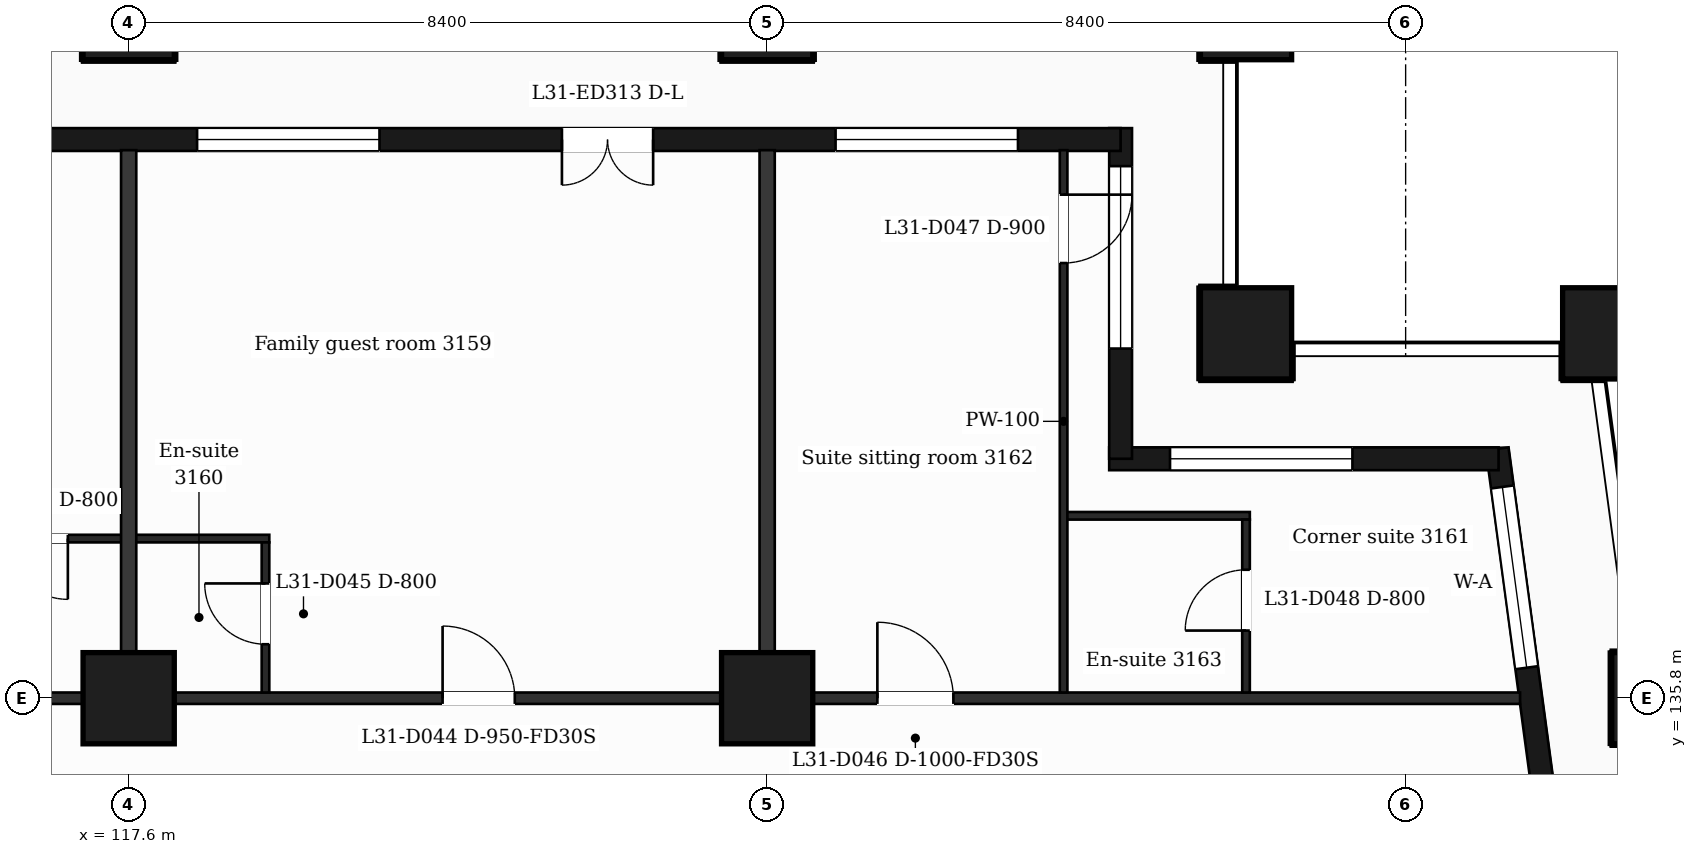
"""IFC4 building model, lengths in metres.
Left out: names, types, materials, properties, quantities, classifications, styles, units other than length and angle.
Written with IfcOpenShell. Run it as: python <this file> out.ifc"""

import sys

from ifc_helpers import new_model, si_unit, direction, frame, frame_2d, origin, origin_2d, place, context, subcontext, project, spatial, rectangle, extrude, element, fill, save


model = new_model("IFC4")
c1 = context("Model", 3, precision=1e-05, world=origin(), true_north=direction((0.0, 1.0)))
c2 = subcontext(c1, "Body", "Model", "MODEL_VIEW")
j1 = project(units=[si_unit("LENGTHUNIT", "METRE"), si_unit("PLANEANGLEUNIT", "RADIAN")], contexts=[c1])
p1 = place(None, origin())
s1 = spatial("IfcSite", under=j1, at=p1, CompositionType="ELEMENT")
p2 = place(p1, origin())
s2 = spatial("IfcBuilding", under=s1, at=p2, CompositionType="ELEMENT")
p3 = place(p2, frame((0.0, 0.0, 131.7)))
s3 = spatial("IfcBuildingStorey", under=s2, at=p3, CompositionType="ELEMENT", Elevation=131.7)
for number, where, z_axis, x_axis in (
    (1, (132.3, 140.6, 0.0), (0.0, 0.0, 1.0), (1.0, 0.0, 0.0)),
    (2, (137.065, 140.6, 0.0), (0.0, 0.0, 1.0), (1.0, 0.0, 0.0)),
    (3, (117.6, 135.8, 0.0), (0.0, 0.0, 1.0), (1.0, 0.0, 0.0)),
    (4, (126.0, 135.8, 0.0), (0.0, 0.0, 1.0), (1.0, 0.0, 0.0)),
    (5, (137.711, 135.8, 0.0), (0.0, 0.0, 1.0), (1.0, 0.0, 0.0)),
    (6, (117.6, 144.8, 0.0), (0.0, 0.0, 1.0), (1.0, 0.0, 0.0)),
    (7, (126.0, 144.8, 0.0), (0.0, 0.0, 1.0), (1.0, 0.0, 0.0)),
    (8, (132.3, 144.8, 0.0), (0.0, 0.0, 1.0), (1.0, 0.0, 0.0)),
):
    element("IfcColumn", number, at=place(p3, frame(where, z_axis=z_axis, x_axis=x_axis)), inside=s3, PredefinedType="COLUMN", context=c2, shape_type="SweptSolid", body=[
        extrude(rectangle(XDim=1.2, YDim=1.2, at=origin_2d()), origin(), (0.0, 0.0, 1.0), 3.7),
    ])
p4 = place(p3, frame((136.504, 132.4, 0.0), z_axis=(0.0, 0.0, 1.0), x_axis=(-0.133399697462, 0.99106231929, 0.0)))
e9 = element("IfcWall", 9, at=p4, inside=s3, PredefinedType="SOLIDWALL", context=c2, shape_type="SweptSolid", body=[
    extrude(rectangle(XDim=6.74, YDim=0.3, at=frame_2d((3.37, 0.0))), origin(), (0.0, 0.0, 1.0), 3.2),
])
p5 = place(p4, frame((1.115, 0.0, 0.0)))
e10 = element("IfcOpeningElement", 10, at=p5, cuts=e9, PredefinedType="OPENING", context=c2, shape_type="SweptSolid", body=[
    extrude(rectangle(XDim=1.2, YDim=2.4, at=frame_2d((0.6, 1.2))), frame((0.0, 0.16, 0.0), z_axis=(0.0, -1.0, 0.0), x_axis=(1.0, 0.0, 0.0)), (0.0, 0.0, 1.0), 0.32),
])
p6 = place(p4, frame((3.835, 0.0, 0.9)))
e11 = element("IfcOpeningElement", 11, at=p6, cuts=e9, PredefinedType="OPENING", context=c2, shape_type="SweptSolid", body=[
    extrude(rectangle(XDim=2.4, YDim=2.1, at=frame_2d((1.2, 1.05))), frame((0.0, 0.16, 0.0), z_axis=(0.0, -1.0, 0.0), x_axis=(1.0, 0.0, 0.0)), (0.0, 0.0, 1.0), 0.32),
])
p7 = place(p3, frame((135.623, 138.95, 0.0), z_axis=(0.0, 0.0, 1.0), x_axis=(-1.0, 0.0, 0.0)))
e12 = element("IfcWall", 12, at=p7, inside=s3, PredefinedType="SOLIDWALL", context=c2, shape_type="SweptSolid", body=[
    extrude(rectangle(XDim=5.123, YDim=0.3, at=frame_2d((2.561, 0.0))), origin(), (0.0, 0.0, 1.0), 3.2),
])
p8 = place(p7, frame((1.923, 0.0, 0.9)))
e13 = element("IfcOpeningElement", 13, at=p8, cuts=e12, PredefinedType="OPENING", context=c2, shape_type="SweptSolid", body=[
    extrude(rectangle(XDim=2.4, YDim=2.1, at=frame_2d((1.2, 1.05))), frame((0.0, 0.16, 0.0), z_axis=(0.0, -1.0, 0.0), x_axis=(1.0, 0.0, 0.0)), (0.0, 0.0, 1.0), 0.32),
])
p9 = place(p3, frame((130.65, 138.95, 0.0), z_axis=(0.0, 0.0, 1.0), x_axis=(0.0, 1.0, 0.0)))
e14 = element("IfcWall", 14, at=p9, inside=s3, PredefinedType="SOLIDWALL", context=c2, shape_type="SweptSolid", body=[
    extrude(rectangle(XDim=4.35, YDim=0.3, at=frame_2d((2.175, 0.0))), origin(), (0.0, 0.0, 1.0), 3.2),
])
p10 = place(p9, frame((1.45, 0.0, 0.9)))
e15 = element("IfcOpeningElement", 15, at=p10, cuts=e14, PredefinedType="OPENING", context=c2, shape_type="SweptSolid", body=[
    extrude(rectangle(XDim=2.4, YDim=2.1, at=frame_2d((1.2, 1.05))), frame((0.0, 0.16, 0.0), z_axis=(0.0, -1.0, 0.0), x_axis=(1.0, 0.0, 0.0)), (0.0, 0.0, 1.0), 0.32),
])
p11 = place(p3, frame((130.65, 143.15, 0.0), z_axis=(0.0, 0.0, 1.0), x_axis=(-1.0, 0.0, 0.0)))
e16 = element("IfcWall", 16, at=p11, inside=s3, PredefinedType="SOLIDWALL", context=c2, shape_type="SweptSolid", body=[
    extrude(rectangle(XDim=14.25, YDim=0.3, at=frame_2d((7.125, 0.0))), origin(), (0.0, 0.0, 1.0), 3.2),
])
p12 = place(p11, frame((1.35, 0.0, 0.9)))
e17 = element("IfcOpeningElement", 17, at=p12, cuts=e16, PredefinedType="OPENING", context=c2, shape_type="SweptSolid", body=[
    extrude(rectangle(XDim=2.4, YDim=2.1, at=frame_2d((1.2, 1.05))), frame((0.0, 0.16, 0.0), z_axis=(0.0, -1.0, 0.0), x_axis=(1.0, 0.0, 0.0)), (0.0, 0.0, 1.0), 0.32),
])
p13 = place(p11, frame((6.15, 0.0, 0.0)))
e18 = element("IfcOpeningElement", 18, at=p13, cuts=e16, PredefinedType="OPENING", context=c2, shape_type="SweptSolid", body=[
    extrude(rectangle(XDim=1.2, YDim=2.4, at=frame_2d((0.6, 1.2))), frame((0.0, 0.16, 0.0), z_axis=(0.0, -1.0, 0.0), x_axis=(1.0, 0.0, 0.0)), (0.0, 0.0, 1.0), 0.32),
])
p14 = place(p11, frame((9.75, 0.0, 0.9)))
e19 = element("IfcOpeningElement", 19, at=p14, cuts=e16, PredefinedType="OPENING", context=c2, shape_type="SweptSolid", body=[
    extrude(rectangle(XDim=2.4, YDim=2.1, at=frame_2d((1.2, 1.05))), frame((0.0, 0.16, 0.0), z_axis=(0.0, -1.0, 0.0), x_axis=(1.0, 0.0, 0.0)), (0.0, 0.0, 1.0), 0.32),
])
p15 = place(p3, frame((90.895, 135.8, 0.0), z_axis=(0.0, 0.0, 1.0), x_axis=(1.0, 0.0, 0.0)))
e20 = element("IfcWall", 20, at=p15, inside=s3, PredefinedType="PARTITIONING", context=c2, shape_type="SweptSolid", body=[
    extrude(rectangle(XDim=45.011, YDim=0.15, at=frame_2d((22.505, 0.0))), origin(), (0.0, 0.0, 1.0), 3.2),
])
p16 = place(p15, frame((8.005, 0.0, 0.0)))
e21 = element("IfcOpeningElement", 21, at=p16, cuts=e20, PredefinedType="OPENING", context=c2, shape_type="SweptSolid", body=[
    extrude(rectangle(XDim=1.0, YDim=2.1, at=frame_2d((0.5, 1.05))), frame((0.0, 0.085, 0.0), z_axis=(0.0, -1.0, 0.0), x_axis=(1.0, 0.0, 0.0)), (0.0, 0.0, 1.0), 0.17),
])
p17 = place(p15, frame((10.625, 0.0, 0.0)))
e22 = element("IfcOpeningElement", 22, at=p17, cuts=e20, PredefinedType="OPENING", context=c2, shape_type="SweptSolid", body=[
    extrude(rectangle(XDim=0.95, YDim=2.1, at=frame_2d((0.475, 1.05))), frame((0.0, 0.085, 0.0), z_axis=(0.0, -1.0, 0.0), x_axis=(1.0, 0.0, 0.0)), (0.0, 0.0, 1.0), 0.17),
])
p18 = place(p15, frame((14.38, 0.0, 0.0)))
e23 = element("IfcOpeningElement", 23, at=p18, cuts=e20, PredefinedType="OPENING", context=c2, shape_type="SweptSolid", body=[
    extrude(rectangle(XDim=0.95, YDim=2.1, at=frame_2d((0.475, 1.05))), frame((0.0, 0.085, 0.0), z_axis=(0.0, -1.0, 0.0), x_axis=(1.0, 0.0, 0.0)), (0.0, 0.0, 1.0), 0.17),
])
p19 = place(p15, frame((21.265, 0.0, 0.0)))
e24 = element("IfcOpeningElement", 24, at=p19, cuts=e20, PredefinedType="OPENING", context=c2, shape_type="SweptSolid", body=[
    extrude(rectangle(XDim=0.95, YDim=2.1, at=frame_2d((0.475, 1.05))), frame((0.0, 0.085, 0.0), z_axis=(0.0, -1.0, 0.0), x_axis=(1.0, 0.0, 0.0)), (0.0, 0.0, 1.0), 0.17),
])
p20 = place(p15, frame((30.835, 0.0, 0.0)))
e25 = element("IfcOpeningElement", 25, at=p20, cuts=e20, PredefinedType="OPENING", context=c2, shape_type="SweptSolid", body=[
    extrude(rectangle(XDim=0.95, YDim=2.1, at=frame_2d((0.475, 1.05))), frame((0.0, 0.085, 0.0), z_axis=(0.0, -1.0, 0.0), x_axis=(1.0, 0.0, 0.0)), (0.0, 0.0, 1.0), 0.17),
])
p21 = place(p15, frame((36.555, 0.0, 0.0)))
e26 = element("IfcOpeningElement", 26, at=p21, cuts=e20, PredefinedType="OPENING", context=c2, shape_type="SweptSolid", body=[
    extrude(rectangle(XDim=1.0, YDim=2.1, at=frame_2d((0.5, 1.05))), frame((0.0, 0.085, 0.0), z_axis=(0.0, -1.0, 0.0), x_axis=(1.0, 0.0, 0.0)), (0.0, 0.0, 1.0), 0.17),
])
p22 = place(p3, frame((115.15, 137.9, 0.0), z_axis=(0.0, 0.0, 1.0), x_axis=(1.0, 0.0, 0.0)))
e27 = element("IfcWall", 27, at=p22, inside=s3, PredefinedType="PARTITIONING", context=c2, shape_type="SweptSolid", body=[
    extrude(rectangle(XDim=4.3, YDim=0.1, at=frame_2d((2.15, 0.0))), origin(), (0.0, 0.0, 1.0), 3.2),
])
p23 = place(p22, frame((0.85, 0.0, 0.0)))
e28 = element("IfcOpeningElement", 28, at=p23, cuts=e27, PredefinedType="OPENING", context=c2, shape_type="SweptSolid", body=[
    extrude(rectangle(XDim=0.8, YDim=2.1, at=frame_2d((0.4, 1.05))), frame((0.0, 0.06, 0.0), z_axis=(0.0, -1.0, 0.0), x_axis=(1.0, 0.0, 0.0)), (0.0, 0.0, 1.0), 0.12),
])
p24 = place(p3, frame((129.9, 138.2, 0.0), z_axis=(0.0, 0.0, 1.0), x_axis=(1.0, 0.0, 0.0)))
e29 = element("IfcWall", 29, at=p24, inside=s3, PredefinedType="PARTITIONING", context=c2, shape_type="SweptSolid", body=[
    extrude(rectangle(XDim=2.45, YDim=0.1, at=frame_2d((1.225, 0.0))), origin(), (0.0, 0.0, 1.0), 3.2),
])
p25 = place(p3, frame((117.6, 135.875, 0.0), z_axis=(0.0, 0.0, 1.0), x_axis=(0.0, 1.0, 0.0)))
e30 = element("IfcWall", 30, at=p25, inside=s3, PredefinedType="PARTITIONING", context=c2, shape_type="SweptSolid", body=[
    extrude(rectangle(XDim=7.135, YDim=0.2, at=frame_2d((3.567, 0.0))), origin(), (0.0, 0.0, 1.0), 3.2),
])
p26 = place(p3, frame((119.4, 135.875, 0.0), z_axis=(0.0, 0.0, 1.0), x_axis=(0.0, 1.0, 0.0)))
e31 = element("IfcWall", 31, at=p26, inside=s3, PredefinedType="PARTITIONING", context=c2, shape_type="SweptSolid", body=[
    extrude(rectangle(XDim=1.975, YDim=0.1, at=frame_2d((0.988, 0.0))), origin(), (0.0, 0.0, 1.0), 3.2),
])
p27 = place(p26, frame((0.635, 0.0, 0.0)))
e32 = element("IfcOpeningElement", 32, at=p27, cuts=e31, PredefinedType="OPENING", context=c2, shape_type="SweptSolid", body=[
    extrude(rectangle(XDim=0.8, YDim=2.1, at=frame_2d((0.4, 1.05))), frame((0.0, 0.06, 0.0), z_axis=(0.0, -1.0, 0.0), x_axis=(1.0, 0.0, 0.0)), (0.0, 0.0, 1.0), 0.12),
])
p28 = place(p3, frame((126.0, 135.875, 0.0), z_axis=(0.0, 0.0, 1.0), x_axis=(0.0, 1.0, 0.0)))
e33 = element("IfcWall", 33, at=p28, inside=s3, PredefinedType="PARTITIONING", context=c2, shape_type="SweptSolid", body=[
    extrude(rectangle(XDim=7.135, YDim=0.2, at=frame_2d((3.567, 0.0))), origin(), (0.0, 0.0, 1.0), 3.2),
])
p29 = place(p3, frame((129.9, 135.875, 0.0), z_axis=(0.0, 0.0, 1.0), x_axis=(0.0, 1.0, 0.0)))
e34 = element("IfcWall", 34, at=p29, inside=s3, PredefinedType="PARTITIONING", context=c2, shape_type="SweptSolid", body=[
    extrude(rectangle(XDim=7.135, YDim=0.1, at=frame_2d((3.567, 0.0))), origin(), (0.0, 0.0, 1.0), 3.2),
])
p30 = place(p29, frame((5.65, 0.0, 0.0)))
e35 = element("IfcOpeningElement", 35, at=p30, cuts=e34, PredefinedType="OPENING", context=c2, shape_type="SweptSolid", body=[
    extrude(rectangle(XDim=0.9, YDim=2.1, at=frame_2d((0.45, 1.05))), frame((0.0, 0.06, 0.0), z_axis=(0.0, -1.0, 0.0), x_axis=(1.0, 0.0, 0.0)), (0.0, 0.0, 1.0), 0.12),
])
p31 = place(p3, frame((132.3, 135.875, 0.0), z_axis=(0.0, 0.0, 1.0), x_axis=(0.0, 1.0, 0.0)))
e36 = element("IfcWall", 36, at=p31, inside=s3, PredefinedType="PARTITIONING", context=c2, shape_type="SweptSolid", body=[
    extrude(rectangle(XDim=2.275, YDim=0.1, at=frame_2d((1.137, 0.0))), origin(), (0.0, 0.0, 1.0), 3.2),
])
p32 = place(p31, frame((0.815, 0.0, 0.0)))
e37 = element("IfcOpeningElement", 37, at=p32, cuts=e36, PredefinedType="OPENING", context=c2, shape_type="SweptSolid", body=[
    extrude(rectangle(XDim=0.8, YDim=2.1, at=frame_2d((0.4, 1.05))), frame((0.0, 0.06, 0.0), z_axis=(0.0, -1.0, 0.0), x_axis=(1.0, 0.0, 0.0)), (0.0, 0.0, 1.0), 0.12),
])
p33 = place(p6, origin())
e38 = element("IfcWindow", 38, at=p33, inside=s3, PartitioningType="SINGLE_PANEL", PredefinedType="WINDOW", context=c2, shape_type="SweptSolid", body=[
    extrude(rectangle(XDim=2.4, YDim=2.1, at=frame_2d((1.2, 1.05))), frame((0.0, 0.03, 0.0), z_axis=(0.0, -1.0, 0.0), x_axis=(1.0, 0.0, 0.0)), (0.0, 0.0, 1.0), 0.06),
])
fill(e11, e38)
p34 = place(p8, origin())
e39 = element("IfcWindow", 39, at=p34, inside=s3, PartitioningType="SINGLE_PANEL", PredefinedType="WINDOW", context=c2, shape_type="SweptSolid", body=[
    extrude(rectangle(XDim=2.4, YDim=2.1, at=frame_2d((1.2, 1.05))), frame((0.0, 0.03, 0.0), z_axis=(0.0, -1.0, 0.0), x_axis=(1.0, 0.0, 0.0)), (0.0, 0.0, 1.0), 0.06),
])
fill(e13, e39)
p35 = place(p10, origin())
e40 = element("IfcWindow", 40, at=p35, inside=s3, PartitioningType="SINGLE_PANEL", PredefinedType="WINDOW", context=c2, shape_type="SweptSolid", body=[
    extrude(rectangle(XDim=2.4, YDim=2.1, at=frame_2d((1.2, 1.05))), frame((0.0, 0.03, 0.0), z_axis=(0.0, -1.0, 0.0), x_axis=(1.0, 0.0, 0.0)), (0.0, 0.0, 1.0), 0.06),
])
fill(e15, e40)
p36 = place(p12, origin())
e41 = element("IfcWindow", 41, at=p36, inside=s3, PartitioningType="SINGLE_PANEL", PredefinedType="WINDOW", context=c2, shape_type="SweptSolid", body=[
    extrude(rectangle(XDim=2.4, YDim=2.1, at=frame_2d((1.2, 1.05))), frame((0.0, 0.03, 0.0), z_axis=(0.0, -1.0, 0.0), x_axis=(1.0, 0.0, 0.0)), (0.0, 0.0, 1.0), 0.06),
])
fill(e17, e41)
p37 = place(p13, origin())
e42 = element("IfcDoor", 42, at=p37, inside=s3, OperationType="DOUBLE_DOOR_SINGLE_SWING", PredefinedType="DOOR", context=c2, shape_type="SweptSolid", body=[
    extrude(rectangle(XDim=1.2, YDim=2.4, at=frame_2d((0.6, 1.2))), frame((0.0, 0.025, 0.0), z_axis=(0.0, -1.0, 0.0), x_axis=(1.0, 0.0, 0.0)), (0.0, 0.0, 1.0), 0.05),
])
fill(e18, e42)
p38 = place(p14, origin())
e43 = element("IfcWindow", 43, at=p38, inside=s3, PartitioningType="SINGLE_PANEL", PredefinedType="WINDOW", context=c2, shape_type="SweptSolid", body=[
    extrude(rectangle(XDim=2.4, YDim=2.1, at=frame_2d((1.2, 1.05))), frame((0.0, 0.03, 0.0), z_axis=(0.0, -1.0, 0.0), x_axis=(1.0, 0.0, 0.0)), (0.0, 0.0, 1.0), 0.06),
])
fill(e19, e43)
p39 = place(p23, origin())
e44 = element("IfcDoor", 44, at=p39, inside=s3, OperationType="SINGLE_SWING_RIGHT", PredefinedType="DOOR", context=c2, shape_type="SweptSolid", body=[
    extrude(rectangle(XDim=0.8, YDim=2.1, at=frame_2d((0.4, 1.05))), frame((0.0, 0.025, 0.0), z_axis=(0.0, -1.0, 0.0), x_axis=(1.0, 0.0, 0.0)), (0.0, 0.0, 1.0), 0.05),
])
fill(e28, e44)
p40 = place(p20, origin())
e45 = element("IfcDoor", 45, at=p40, inside=s3, OperationType="SINGLE_SWING_LEFT", PredefinedType="DOOR", context=c2, shape_type="SweptSolid", body=[
    extrude(rectangle(XDim=0.95, YDim=2.1, at=frame_2d((0.475, 1.05))), frame((0.0, 0.025, 0.0), z_axis=(0.0, -1.0, 0.0), x_axis=(1.0, 0.0, 0.0)), (0.0, 0.0, 1.0), 0.05),
])
fill(e25, e45)
p41 = place(p27, origin())
e46 = element("IfcDoor", 46, at=p41, inside=s3, OperationType="SINGLE_SWING_RIGHT", PredefinedType="DOOR", context=c2, shape_type="SweptSolid", body=[
    extrude(rectangle(XDim=0.8, YDim=2.1, at=frame_2d((0.4, 1.05))), frame((0.0, 0.025, 0.0), z_axis=(0.0, -1.0, 0.0), x_axis=(1.0, 0.0, 0.0)), (0.0, 0.0, 1.0), 0.05),
])
fill(e32, e46)
p42 = place(p21, origin())
e47 = element("IfcDoor", 47, at=p42, inside=s3, OperationType="SINGLE_SWING_LEFT", PredefinedType="DOOR", context=c2, shape_type="SweptSolid", body=[
    extrude(rectangle(XDim=1.0, YDim=2.1, at=frame_2d((0.5, 1.05))), frame((0.0, 0.025, 0.0), z_axis=(0.0, -1.0, 0.0), x_axis=(1.0, 0.0, 0.0)), (0.0, 0.0, 1.0), 0.05),
])
fill(e26, e47)
p43 = place(p30, origin())
e48 = element("IfcDoor", 48, at=p43, inside=s3, OperationType="SINGLE_SWING_RIGHT", PredefinedType="DOOR", context=c2, shape_type="SweptSolid", body=[
    extrude(rectangle(XDim=0.9, YDim=2.1, at=frame_2d((0.45, 1.05))), frame((0.0, 0.025, 0.0), z_axis=(0.0, -1.0, 0.0), x_axis=(1.0, 0.0, 0.0)), (0.0, 0.0, 1.0), 0.05),
])
fill(e35, e48)
p44 = place(p32, origin())
e49 = element("IfcDoor", 49, at=p44, inside=s3, OperationType="SINGLE_SWING_LEFT", PredefinedType="DOOR", context=c2, shape_type="SweptSolid", body=[
    extrude(rectangle(XDim=0.8, YDim=2.1, at=frame_2d((0.4, 1.05))), frame((0.0, 0.025, 0.0), z_axis=(0.0, -1.0, 0.0), x_axis=(1.0, 0.0, 0.0)), (0.0, 0.0, 1.0), 0.05),
])
fill(e37, e49)
save(model, sys.argv[1])
